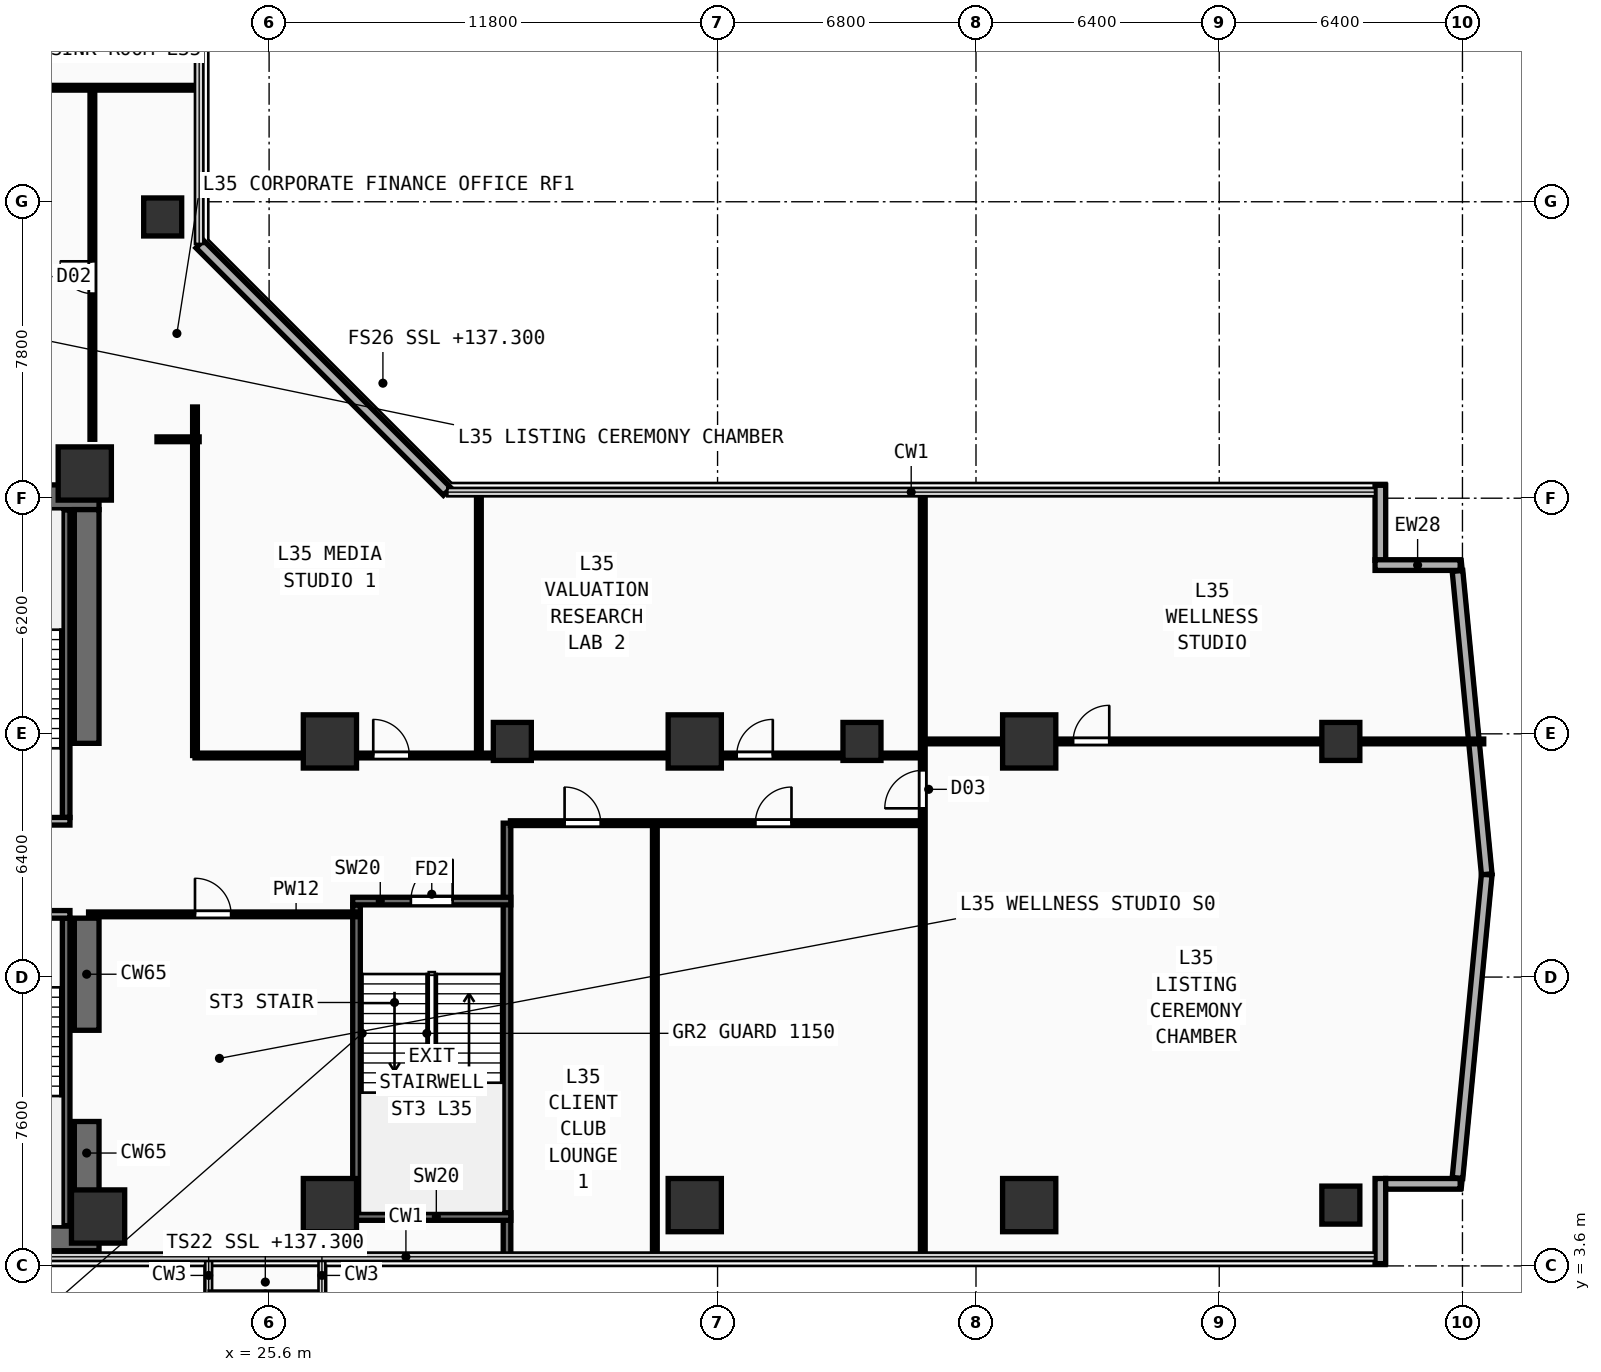
"""IFC4 building model, lengths in metres.
Left out: names, types, materials, properties, quantities, classifications, styles, units other than length and angle.
Written with IfcOpenShell. Run it as: python <this file> out.ifc"""

import sys

from ifc_helpers import new_model, si_unit, direction, frame, frame_2d, origin, origin_2d, place, context, subcontext, project, spatial, rectangle, extrude, element, fill, save


model = new_model("IFC4")
c1 = context("Model", 3, precision=1e-05, world=origin(), true_north=direction((0.0, 1.0)))
c2 = subcontext(c1, "Body", "Model", "MODEL_VIEW")
j1 = project(units=[si_unit("LENGTHUNIT", "METRE"), si_unit("PLANEANGLEUNIT", "RADIAN")], contexts=[c1])
p1 = place(None, origin())
s1 = spatial("IfcSite", under=j1, at=p1, CompositionType="ELEMENT")
p2 = place(p1, origin())
s2 = spatial("IfcBuilding", under=s1, at=p2, CompositionType="ELEMENT")
p3 = place(p2, frame((0.0, 0.0, 137.3)))
s3 = spatial("IfcBuildingStorey", under=s2, at=p3, CompositionType="ELEMENT", Elevation=137.3)
for number, where, z_axis, x_axis in (
    (1, (7.125, 4.325, 0.0), (0.0, 0.0, 1.0), (1.0, 0.0, 0.0)),
    (2, (7.125, 23.825, 0.0), (0.0, 0.0, 1.0), (1.0, 0.0, 0.0)),
):
    element("IfcWall", number, at=place(p3, frame(where, z_axis=z_axis, x_axis=x_axis)), inside=s3, PredefinedType="SHEAR", context=c2, shape_type="SweptSolid", body=[
        extrude(rectangle(XDim=14.0, YDim=0.65, at=frame_2d((7.0, 0.0))), origin(), (0.0, 0.0, 1.0), 3.42),
    ])
p4 = place(p3, frame((20.8, 4.65, 0.0), z_axis=(0.0, 0.0, 1.0), x_axis=(0.0, 1.0, 0.0)))
e3 = element("IfcWall", 3, at=p4, inside=s3, PredefinedType="SHEAR", context=c2, shape_type="SweptSolid", body=[
    extrude(rectangle(XDim=2.75, YDim=0.65, at=frame_2d((1.375, 0.0))), origin(), (0.0, 0.0, 1.0), 3.42),
])
p5 = place(p3, frame((20.8, 9.8, 0.0), z_axis=(0.0, 0.0, 1.0), x_axis=(0.0, 1.0, 0.0)))
e4 = element("IfcWall", 4, at=p5, inside=s3, PredefinedType="SHEAR", context=c2, shape_type="SweptSolid", body=[
    extrude(rectangle(XDim=2.95, YDim=0.65, at=frame_2d((1.475, 0.0))), origin(), (0.0, 0.0, 1.0), 3.42),
])
p6 = place(p3, frame((20.8, 17.35, 0.0), z_axis=(0.0, 0.0, 1.0), x_axis=(0.0, 1.0, 0.0)))
e5 = element("IfcWall", 5, at=p6, inside=s3, PredefinedType="SHEAR", context=c2, shape_type="SweptSolid", body=[
    extrude(rectangle(XDim=6.15, YDim=0.65, at=frame_2d((3.075, 0.0))), origin(), (0.0, 0.0, 1.0), 3.42),
])
for number, where, z_axis, x_axis in (
    (6, (21.1, 4.9, 0.0), (0.0, 0.0, 1.0), (1.0, 0.0, 0.0)),
    (7, (20.75, 24.45, 0.0), (0.0, 0.0, 1.0), (1.0, 0.0, 0.0)),
    (8, (27.2, 5.2, 0.0), (0.0, 0.0, 1.0), (1.0, 0.0, 0.0)),
    (9, (36.8, 5.2, 0.0), (0.0, 0.0, 1.0), (1.0, 0.0, 0.0)),
    (10, (45.6, 5.2, 0.0), (0.0, 0.0, 1.0), (1.0, 0.0, 0.0)),
    (11, (27.2, 17.4, 0.0), (0.0, 0.0, 1.0), (1.0, 0.0, 0.0)),
    (12, (36.8, 17.4, 0.0), (0.0, 0.0, 1.0), (1.0, 0.0, 0.0)),
    (13, (45.6, 17.4, 0.0), (0.0, 0.0, 1.0), (1.0, 0.0, 0.0)),
):
    element("IfcColumn", number, at=place(p3, frame(where, z_axis=z_axis, x_axis=x_axis)), inside=s3, PredefinedType="COLUMN", context=c2, shape_type="SweptSolid", body=[
        extrude(rectangle(XDim=1.4, YDim=1.4, at=origin_2d()), origin(), (0.0, 0.0, 1.0), 3.42),
    ])
for number, where, z_axis, x_axis in (
    (14, (53.8, 5.2, 0.0), (0.0, 0.0, 1.0), (1.0, 0.0, 0.0)),
    (15, (53.8, 17.4, 0.0), (0.0, 0.0, 1.0), (1.0, 0.0, 0.0)),
    (16, (22.8, 31.2, 0.0), (0.0, 0.0, 1.0), (1.0, 0.0, 0.0)),
    (17, (32.0, 17.4, 0.0), (0.0, 0.0, 1.0), (1.0, 0.0, 0.0)),
    (18, (41.2, 17.4, 0.0), (0.0, 0.0, 1.0), (1.0, 0.0, 0.0)),
):
    element("IfcColumn", number, at=place(p3, frame(where, z_axis=z_axis, x_axis=x_axis)), inside=s3, PredefinedType="COLUMN", context=c2, shape_type="SweptSolid", body=[
        extrude(rectangle(XDim=1.0, YDim=1.0, at=origin_2d()), origin(), (0.0, 0.0, 1.0), 3.42),
    ])
p7 = place(p3, frame((54.84, 3.66, 0.0), z_axis=(0.0, 0.0, 1.0), x_axis=(0.0, 1.0, 0.0)))
e19 = element("IfcWall", 19, at=p7, inside=s3, PredefinedType="SOLIDWALL", context=c2, shape_type="SweptSolid", body=[
    extrude(rectangle(XDim=2.24, YDim=0.28, at=frame_2d((1.12, 0.0))), origin(), (0.0, 0.0, 1.0), 3.42),
])
p8 = place(p3, frame((54.98, 5.76, 0.0), z_axis=(0.0, 0.0, 1.0), x_axis=(1.0, 0.0, 0.0)))
e20 = element("IfcWall", 20, at=p8, inside=s3, PredefinedType="SOLIDWALL", context=c2, shape_type="SweptSolid", body=[
    extrude(rectangle(XDim=1.96, YDim=0.28, at=frame_2d((0.98, 0.0))), origin(), (0.0, 0.0, 1.0), 3.42),
])
p9 = place(p3, frame((54.84, 22.165, 0.0), z_axis=(0.0, 0.0, 1.0), x_axis=(0.0, 1.0, 0.0)))
e21 = element("IfcWall", 21, at=p9, inside=s3, PredefinedType="SOLIDWALL", context=c2, shape_type="SweptSolid", body=[
    extrude(rectangle(XDim=1.975, YDim=0.28, at=frame_2d((0.987, 0.0))), origin(), (0.0, 0.0, 1.0), 3.42),
])
p10 = place(p3, frame((54.7, 22.04, 0.0), z_axis=(0.0, 0.0, 1.0), x_axis=(1.0, 0.0, 0.0)))
e22 = element("IfcWall", 22, at=p10, inside=s3, PredefinedType="SOLIDWALL", context=c2, shape_type="SweptSolid", body=[
    extrude(rectangle(XDim=2.24, YDim=0.28, at=frame_2d((1.12, 0.0))), origin(), (0.0, 0.0, 1.0), 3.42),
])
p11 = place(p3, frame((30.285, 23.975, 0.0), z_axis=(0.0, 0.0, 1.0), x_axis=(-0.707106781187, 0.707106781187, 0.0)))
e23 = element("IfcWall", 23, at=p11, inside=s3, PredefinedType="SOLIDWALL", context=c2, shape_type="SweptSolid", body=[
    extrude(rectangle(XDim=9.207, YDim=0.28, at=frame_2d((4.603, 0.0))), origin(), (0.0, 0.0, 1.0), 3.42),
])
for number, where, z_axis, x_axis in (
    (24, (56.869, 5.914, 0.0), (0.0, 0.0, 1.0), (0.096, 0.995, 0.0)),
    (25, (57.639, 13.905, 0.0), (0.0, 0.0, 1.0), (-0.096, 0.995, 0.0)),
):
    element("IfcWall", number, at=place(p3, frame(where, z_axis=z_axis, x_axis=x_axis)), inside=s3, PredefinedType="SOLIDWALL", context=c2, shape_type="SweptSolid", body=[
        extrude(rectangle(XDim=8.019, YDim=0.28, at=frame_2d((4.009, 0.0))), origin(), (0.0, 0.0, 1.0), 3.42),
    ])
p12 = place(p3, frame((20.26, 4.66, 0.0), z_axis=(0.0, 0.0, 1.0), x_axis=(0.0, 1.0, 0.0)))
e26 = element("IfcWall", 26, at=p12, inside=s3, PredefinedType="SHEAR", context=c2, shape_type="SweptSolid", body=[
    extrude(rectangle(XDim=8.09, YDim=0.2, at=frame_2d((4.045, 0.0))), origin(), (0.0, 0.0, 1.0), 3.42),
])
p13 = place(p3, frame((16.4, 12.85, 0.0), z_axis=(0.0, 0.0, 1.0), x_axis=(1.0, 0.0, 0.0)))
e27 = element("IfcWall", 27, at=p13, inside=s3, PredefinedType="PARTITIONING", context=c2, shape_type="SweptSolid", body=[
    extrude(rectangle(XDim=3.96, YDim=0.2, at=frame_2d((1.98, 0.0))), origin(), (0.0, 0.0, 1.0), 3.42),
])
p14 = place(p13, frame((1.304, 0.0, 0.0)))
e28 = element("IfcOpeningElement", 28, at=p14, cuts=e27, PredefinedType="OPENING", context=c2, shape_type="SweptSolid", body=[
    extrude(rectangle(XDim=1.1, YDim=2.2, at=frame_2d((0.55, 1.1))), frame((0.0, 0.11, 0.0), z_axis=(0.0, -1.0, 0.0), x_axis=(1.0, 0.0, 0.0)), (0.0, 0.0, 1.0), 0.22),
])
p15 = place(p3, frame((20.26, 15.4, 0.0), z_axis=(0.0, 0.0, 1.0), x_axis=(0.0, 1.0, 0.0)))
e29 = element("IfcWall", 29, at=p15, inside=s3, PredefinedType="SHEAR", context=c2, shape_type="SweptSolid", body=[
    extrude(rectangle(XDim=8.09, YDim=0.2, at=frame_2d((4.045, 0.0))), origin(), (0.0, 0.0, 1.0), 3.42),
])
p16 = place(p3, frame((16.41, 15.3, 0.0), z_axis=(0.0, 0.0, 1.0), x_axis=(1.0, 0.0, 0.0)))
e30 = element("IfcWall", 30, at=p16, inside=s3, PredefinedType="PARTITIONING", context=c2, shape_type="SweptSolid", body=[
    extrude(rectangle(XDim=3.95, YDim=0.2, at=frame_2d((1.975, 0.0))), origin(), (0.0, 0.0, 1.0), 3.42),
])
p17 = place(p16, frame((1.294, 0.0, 0.0)))
e31 = element("IfcOpeningElement", 31, at=p17, cuts=e30, PredefinedType="OPENING", context=c2, shape_type="SweptSolid", body=[
    extrude(rectangle(XDim=1.1, YDim=2.2, at=frame_2d((0.55, 1.1))), frame((0.0, 0.11, 0.0), z_axis=(0.0, -1.0, 0.0), x_axis=(1.0, 0.0, 0.0)), (0.0, 0.0, 1.0), 0.22),
])
p18 = place(p3, frame((27.9, 5.0, 0.0), z_axis=(0.0, 0.0, 1.0), x_axis=(0.0, 1.0, 0.0)))
e32 = element("IfcWall", 32, at=p18, inside=s3, PredefinedType="SHEAR", context=c2, shape_type="SweptSolid", body=[
    extrude(rectangle(XDim=8.1, YDim=0.2, at=frame_2d((4.05, 0.0))), origin(), (0.0, 0.0, 1.0), 3.42),
])
p19 = place(p3, frame((31.86, 3.84, 0.0), z_axis=(0.0, 0.0, 1.0), x_axis=(0.0, 1.0, 0.0)))
e33 = element("IfcWall", 33, at=p19, inside=s3, PredefinedType="SHEAR", context=c2, shape_type="SweptSolid", body=[
    extrude(rectangle(XDim=11.41, YDim=0.2, at=frame_2d((5.705, 0.0))), origin(), (0.0, 0.0, 1.0), 3.42),
])
p20 = place(p3, frame((27.8, 4.9, 0.0), z_axis=(0.0, 0.0, 1.0), x_axis=(1.0, 0.0, 0.0)))
e34 = element("IfcWall", 34, at=p20, inside=s3, PredefinedType="SHEAR", context=c2, shape_type="SweptSolid", body=[
    extrude(rectangle(XDim=4.16, YDim=0.2, at=frame_2d((2.08, 0.0))), origin(), (0.0, 0.0, 1.0), 3.42),
])
p21 = place(p3, frame((27.8, 13.2, 0.0), z_axis=(0.0, 0.0, 1.0), x_axis=(1.0, 0.0, 0.0)))
e35 = element("IfcWall", 35, at=p21, inside=s3, PredefinedType="SHEAR", context=c2, shape_type="SweptSolid", body=[
    extrude(rectangle(XDim=4.16, YDim=0.2, at=frame_2d((2.08, 0.0))), origin(), (0.0, 0.0, 1.0), 3.42),
])
p22 = place(p21, frame((1.53, 0.0, 0.0)))
e36 = element("IfcOpeningElement", 36, at=p22, cuts=e35, PredefinedType="OPENING", context=c2, shape_type="SweptSolid", body=[
    extrude(rectangle(XDim=1.1, YDim=2.2, at=frame_2d((0.55, 1.1))), frame((0.0, 0.11, 0.0), z_axis=(0.0, -1.0, 0.0), x_axis=(1.0, 0.0, 0.0)), (0.0, 0.0, 1.0), 0.22),
])
p23 = place(p3, frame((20.85, 12.85, 0.0), z_axis=(0.0, 0.0, 1.0), x_axis=(1.0, 0.0, 0.0)))
e37 = element("IfcWall", 37, at=p23, inside=s3, PredefinedType="PARTITIONING", context=c2, shape_type="SweptSolid", body=[
    extrude(rectangle(XDim=7.05, YDim=0.125, at=frame_2d((3.525, 0.0))), origin(), (0.0, 0.0, 1.0), 3.42),
])
p24 = place(p23, frame((2.8, 0.0, 0.0)))
e38 = element("IfcOpeningElement", 38, at=p24, cuts=e37, PredefinedType="OPENING", context=c2, shape_type="SweptSolid", body=[
    extrude(rectangle(XDim=0.95, YDim=2.15, at=frame_2d((0.475, 1.075))), frame((0.0, 0.073, 0.0), z_axis=(0.0, -1.0, 0.0), x_axis=(1.0, 0.0, 0.0)), (0.0, 0.0, 1.0), 0.145),
])
p25 = place(p3, frame((20.95, 25.35, 0.0), z_axis=(0.0, 0.0, 1.0), x_axis=(0.0, 1.0, 0.0)))
e39 = element("IfcWall", 39, at=p25, inside=s3, PredefinedType="PARTITIONING", context=c2, shape_type="SweptSolid", body=[
    extrude(rectangle(XDim=9.25, YDim=0.125, at=frame_2d((4.625, 0.0))), origin(), (0.0, 0.0, 1.0), 3.42),
])
p26 = place(p25, frame((3.833, 0.0, 0.0)))
e40 = element("IfcOpeningElement", 40, at=p26, cuts=e39, PredefinedType="OPENING", context=c2, shape_type="SweptSolid", body=[
    extrude(rectangle(XDim=0.85, YDim=2.15, at=frame_2d((0.425, 1.075))), frame((0.0, 0.073, 0.0), z_axis=(0.0, -1.0, 0.0), x_axis=(1.0, 0.0, 0.0)), (0.0, 0.0, 1.0), 0.145),
])
p27 = place(p3, frame((22.65, 25.35, 0.0), z_axis=(0.0, 0.0, 1.0), x_axis=(1.0, 0.0, 0.0)))
e41 = element("IfcWall", 41, at=p27, inside=s3, PredefinedType="PARTITIONING", context=c2, shape_type="SweptSolid", body=[
    extrude(rectangle(XDim=1.11, YDim=0.125, at=frame_2d((0.555, 0.0))), origin(), (0.0, 0.0, 1.0), 3.42),
])
p28 = place(p3, frame((10.19, 34.6, 0.0), z_axis=(0.0, 0.0, 1.0), x_axis=(1.0, 0.0, 0.0)))
e42 = element("IfcWall", 42, at=p28, inside=s3, PredefinedType="PARTITIONING", context=c2, shape_type="SweptSolid", body=[
    extrude(rectangle(XDim=13.57, YDim=0.125, at=frame_2d((6.785, 0.0))), origin(), (0.0, 0.0, 1.0), 3.42),
])
p29 = place(p3, frame((31.95, 15.25, 0.0), z_axis=(0.0, 0.0, 1.0), x_axis=(1.0, 0.0, 0.0)))
e43 = element("IfcWall", 43, at=p29, inside=s3, PredefinedType="PARTITIONING", context=c2, shape_type="SweptSolid", body=[
    extrude(rectangle(XDim=10.85, YDim=0.125, at=frame_2d((5.425, 0.0))), origin(), (0.0, 0.0, 1.0), 3.02),
])
p30 = place(p29, frame((1.425, 0.0, 0.0)))
e44 = element("IfcOpeningElement", 44, at=p30, cuts=e43, PredefinedType="OPENING", context=c2, shape_type="SweptSolid", body=[
    extrude(rectangle(XDim=0.95, YDim=2.15, at=frame_2d((0.475, 1.075))), frame((0.0, 0.073, 0.0), z_axis=(0.0, -1.0, 0.0), x_axis=(1.0, 0.0, 0.0)), (0.0, 0.0, 1.0), 0.145),
])
p31 = place(p29, frame((6.445, 0.0, 0.0)))
e45 = element("IfcOpeningElement", 45, at=p31, cuts=e43, PredefinedType="OPENING", context=c2, shape_type="SweptSolid", body=[
    extrude(rectangle(XDim=0.95, YDim=2.15, at=frame_2d((0.475, 1.075))), frame((0.0, 0.073, 0.0), z_axis=(0.0, -1.0, 0.0), x_axis=(1.0, 0.0, 0.0)), (0.0, 0.0, 1.0), 0.145),
])
p32 = place(p3, frame((35.75, 3.84, 0.0), z_axis=(0.0, 0.0, 1.0), x_axis=(0.0, 1.0, 0.0)))
e46 = element("IfcWall", 46, at=p32, inside=s3, PredefinedType="PARTITIONING", context=c2, shape_type="SweptSolid", body=[
    extrude(rectangle(XDim=11.41, YDim=0.125, at=frame_2d((5.705, 0.0))), origin(), (0.0, 0.0, 1.0), 3.42),
])
p33 = place(p3, frame((42.8, 3.84, 0.0), z_axis=(0.0, 0.0, 1.0), x_axis=(0.0, 1.0, 0.0)))
e47 = element("IfcWall", 47, at=p33, inside=s3, PredefinedType="PARTITIONING", context=c2, shape_type="SweptSolid", body=[
    extrude(rectangle(XDim=20.12, YDim=0.125, at=frame_2d((10.06, 0.0))), origin(), (0.0, 0.0, 1.0), 3.42),
])
p34 = place(p33, frame((11.8, 0.0, 0.0)))
e48 = element("IfcOpeningElement", 48, at=p34, cuts=e47, PredefinedType="OPENING", context=c2, shape_type="SweptSolid", body=[
    extrude(rectangle(XDim=1.0, YDim=2.2, at=frame_2d((0.5, 1.1))), frame((0.0, 0.073, 0.0), z_axis=(0.0, -1.0, 0.0), x_axis=(1.0, 0.0, 0.0)), (0.0, 0.0, 1.0), 0.145),
])
p35 = place(p3, frame((42.8, 17.4, 0.0), z_axis=(0.0, 0.0, 1.0), x_axis=(1.0, 0.0, 0.0)))
e49 = element("IfcWall", 49, at=p35, inside=s3, PredefinedType="PARTITIONING", context=c2, shape_type="SweptSolid", body=[
    extrude(rectangle(XDim=14.76, YDim=0.125, at=frame_2d((7.38, 0.0))), origin(), (0.0, 0.0, 1.0), 3.06),
])
p36 = place(p35, frame((3.956, 0.0, 0.0)))
e50 = element("IfcOpeningElement", 50, at=p36, cuts=e49, PredefinedType="OPENING", context=c2, shape_type="SweptSolid", body=[
    extrude(rectangle(XDim=0.95, YDim=2.15, at=frame_2d((0.475, 1.075))), frame((0.0, 0.073, 0.0), z_axis=(0.0, -1.0, 0.0), x_axis=(1.0, 0.0, 0.0)), (0.0, 0.0, 1.0), 0.145),
])
p37 = place(p3, frame((23.65, 17.03, 0.0), z_axis=(0.0, 0.0, 1.0), x_axis=(0.0, 1.0, 0.0)))
e51 = element("IfcWall", 51, at=p37, inside=s3, PredefinedType="PARTITIONING", context=c2, shape_type="SweptSolid", body=[
    extrude(rectangle(XDim=9.17, YDim=0.125, at=frame_2d((4.585, 0.0))), origin(), (0.0, 0.0, 1.0), 3.42),
])
p38 = place(p3, frame((23.65, 17.03, 0.0), z_axis=(0.0, 0.0, 1.0), x_axis=(1.0, 0.0, 0.0)))
e52 = element("IfcWall", 52, at=p38, inside=s3, PredefinedType="PARTITIONING", context=c2, shape_type="SweptSolid", body=[
    extrude(rectangle(XDim=19.15, YDim=0.125, at=frame_2d((9.575, 0.0))), origin(), (0.0, 0.0, 1.0), 3.06),
])
p39 = place(p38, frame((4.69, 0.0, 0.0)))
e53 = element("IfcOpeningElement", 53, at=p39, cuts=e52, PredefinedType="OPENING", context=c2, shape_type="SweptSolid", body=[
    extrude(rectangle(XDim=0.95, YDim=2.15, at=frame_2d((0.475, 1.075))), frame((0.0, 0.073, 0.0), z_axis=(0.0, -1.0, 0.0), x_axis=(1.0, 0.0, 0.0)), (0.0, 0.0, 1.0), 0.145),
])
p40 = place(p38, frame((14.254, 0.0, 0.0)))
e54 = element("IfcOpeningElement", 54, at=p40, cuts=e52, PredefinedType="OPENING", context=c2, shape_type="SweptSolid", body=[
    extrude(rectangle(XDim=0.95, YDim=2.15, at=frame_2d((0.475, 1.075))), frame((0.0, 0.073, 0.0), z_axis=(0.0, -1.0, 0.0), x_axis=(1.0, 0.0, 0.0)), (0.0, 0.0, 1.0), 0.145),
])
p41 = place(p3, frame((31.12, 17.03, 0.0), z_axis=(0.0, 0.0, 1.0), x_axis=(0.0, 1.0, 0.0)))
e55 = element("IfcWall", 55, at=p41, inside=s3, PredefinedType="PARTITIONING", context=c2, shape_type="SweptSolid", body=[
    extrude(rectangle(XDim=6.93, YDim=0.125, at=frame_2d((3.465, 0.0))), origin(), (0.0, 0.0, 1.0), 3.42),
])
p42 = place(p22, frame((1.1, 0.0, 0.0), z_axis=(0.0, 0.0, 1.0), x_axis=(-1.0, 0.0, 0.0)))
e56 = element("IfcDoor", 56, at=p42, inside=s3, OperationType="SINGLE_SWING_LEFT", PredefinedType="DOOR", context=c2, shape_type="SweptSolid", body=[
    extrude(rectangle(XDim=1.1, YDim=2.2, at=frame_2d((0.55, 1.1))), frame((0.0, 0.025, 0.0), z_axis=(0.0, -1.0, 0.0), x_axis=(1.0, 0.0, 0.0)), (0.0, 0.0, 1.0), 0.05),
])
fill(e36, e56)
p43 = place(p24, origin())
e57 = element("IfcDoor", 57, at=p43, inside=s3, OperationType="SINGLE_SWING_LEFT", PredefinedType="DOOR", context=c2, shape_type="SweptSolid", body=[
    extrude(rectangle(XDim=0.95, YDim=2.15, at=frame_2d((0.475, 1.075))), frame((0.0, 0.025, 0.0), z_axis=(0.0, -1.0, 0.0), x_axis=(1.0, 0.0, 0.0)), (0.0, 0.0, 1.0), 0.05),
])
fill(e38, e57)
p44 = place(p26, origin())
e58 = element("IfcDoor", 58, at=p44, inside=s3, OperationType="SINGLE_SWING_RIGHT", PredefinedType="DOOR", context=c2, shape_type="SweptSolid", body=[
    extrude(rectangle(XDim=0.85, YDim=2.15, at=frame_2d((0.425, 1.075))), frame((0.0, 0.025, 0.0), z_axis=(0.0, -1.0, 0.0), x_axis=(1.0, 0.0, 0.0)), (0.0, 0.0, 1.0), 0.05),
])
fill(e40, e58)
p45 = place(p30, origin())
e59 = element("IfcDoor", 59, at=p45, inside=s3, OperationType="SINGLE_SWING_LEFT", PredefinedType="DOOR", context=c2, shape_type="SweptSolid", body=[
    extrude(rectangle(XDim=0.95, YDim=2.15, at=frame_2d((0.475, 1.075))), frame((0.0, 0.025, 0.0), z_axis=(0.0, -1.0, 0.0), x_axis=(1.0, 0.0, 0.0)), (0.0, 0.0, 1.0), 0.05),
])
fill(e44, e59)
p46 = place(p31, origin())
e60 = element("IfcDoor", 60, at=p46, inside=s3, OperationType="SINGLE_SWING_RIGHT", PredefinedType="DOOR", context=c2, shape_type="SweptSolid", body=[
    extrude(rectangle(XDim=0.95, YDim=2.15, at=frame_2d((0.475, 1.075))), frame((0.0, 0.025, 0.0), z_axis=(0.0, -1.0, 0.0), x_axis=(1.0, 0.0, 0.0)), (0.0, 0.0, 1.0), 0.05),
])
fill(e45, e60)
p47 = place(p34, origin())
e61 = element("IfcDoor", 61, at=p47, inside=s3, OperationType="SINGLE_SWING_LEFT", PredefinedType="DOOR", context=c2, shape_type="SweptSolid", body=[
    extrude(rectangle(XDim=1.0, YDim=2.2, at=frame_2d((0.5, 1.1))), frame((0.0, 0.025, 0.0), z_axis=(0.0, -1.0, 0.0), x_axis=(1.0, 0.0, 0.0)), (0.0, 0.0, 1.0), 0.05),
])
fill(e48, e61)
p48 = place(p36, origin())
e62 = element("IfcDoor", 62, at=p48, inside=s3, OperationType="SINGLE_SWING_RIGHT", PredefinedType="DOOR", context=c2, shape_type="SweptSolid", body=[
    extrude(rectangle(XDim=0.95, YDim=2.15, at=frame_2d((0.475, 1.075))), frame((0.0, 0.025, 0.0), z_axis=(0.0, -1.0, 0.0), x_axis=(1.0, 0.0, 0.0)), (0.0, 0.0, 1.0), 0.05),
])
fill(e50, e62)
p49 = place(p39, origin())
e63 = element("IfcDoor", 63, at=p49, inside=s3, OperationType="SINGLE_SWING_LEFT", PredefinedType="DOOR", context=c2, shape_type="SweptSolid", body=[
    extrude(rectangle(XDim=0.95, YDim=2.15, at=frame_2d((0.475, 1.075))), frame((0.0, 0.025, 0.0), z_axis=(0.0, -1.0, 0.0), x_axis=(1.0, 0.0, 0.0)), (0.0, 0.0, 1.0), 0.05),
])
fill(e53, e63)
p50 = place(p40, origin())
e64 = element("IfcDoor", 64, at=p50, inside=s3, OperationType="SINGLE_SWING_RIGHT", PredefinedType="DOOR", context=c2, shape_type="SweptSolid", body=[
    extrude(rectangle(XDim=0.95, YDim=2.15, at=frame_2d((0.475, 1.075))), frame((0.0, 0.025, 0.0), z_axis=(0.0, -1.0, 0.0), x_axis=(1.0, 0.0, 0.0)), (0.0, 0.0, 1.0), 0.05),
])
fill(e54, e64)
save(model, sys.argv[1])
